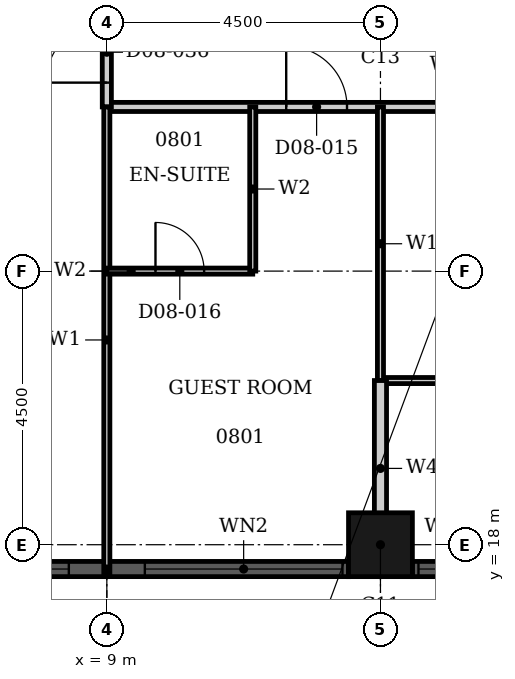
"""IFC4 building model, lengths in metres.
Left out: names, types, materials, properties, quantities, classifications, styles, units other than length and angle.
Written with IfcOpenShell. Run it as: python <this file> out.ifc"""

import sys

from ifc_helpers import new_model, si_unit, direction, frame, frame_2d, origin, origin_2d, place, context, subcontext, project, spatial, rectangle, hollow_rectangle, extrude, element, fill, save


model = new_model("IFC4")
c1 = context("Model", 3, precision=1e-05, world=origin(), true_north=direction((0.0, 1.0)))
c2 = subcontext(c1, "Body", "Model", "MODEL_VIEW")
j1 = project(units=[si_unit("LENGTHUNIT", "METRE"), si_unit("PLANEANGLEUNIT", "RADIAN")], contexts=[c1])
p1 = place(None, origin())
s1 = spatial("IfcSite", under=j1, at=p1, CompositionType="ELEMENT")
p2 = place(p1, origin())
s2 = spatial("IfcBuilding", under=s1, at=p2, CompositionType="ELEMENT")
p3 = place(p2, frame((0.0, 0.0, 40.8)))
s3 = spatial("IfcBuildingStorey", under=s2, at=p3, CompositionType="ELEMENT", Elevation=40.8)
p4 = place(p3, frame((13.5, 18.0, 0.0), z_axis=(0.0, 0.0, 1.0), x_axis=(1.0, 0.0, 0.0)))
e1 = element("IfcColumn", 1, at=p4, inside=s3, PredefinedType="COLUMN", context=c2, shape_type="SweptSolid", body=[
    extrude(hollow_rectangle(XDim=1.05, YDim=1.05, WallThickness=0.034, at=origin_2d()), origin(), (0.0, 0.0, 1.0), 3.6),
])
p5 = place(p3, frame((5.025, 17.6, 0.0), z_axis=(0.0, 0.0, 1.0), x_axis=(1.0, 0.0, 0.0)))
e2 = element("IfcWall", 2, at=p5, inside=s3, PredefinedType="SOLIDWALL", context=c2, shape_type="SweptSolid", body=[
    extrude(rectangle(XDim=7.95, YDim=0.25, at=frame_2d((3.975, 0.0))), origin(), (0.0, 0.0, 1.0), 3.6),
])
p6 = place(p5, frame((0.1, 0.0, 0.9)))
e3 = element("IfcOpeningElement", 3, at=p6, cuts=e2, PredefinedType="OPENING", context=c2, shape_type="SweptSolid", body=[
    extrude(rectangle(XDim=3.25, YDim=2.08, at=frame_2d((1.625, 1.04))), frame((0.0, 0.135, 0.0), z_axis=(0.0, -1.0, 0.0), x_axis=(1.0, 0.0, 0.0)), (0.0, 0.0, 1.0), 0.27),
])
p7 = place(p5, frame((4.6, 0.0, 0.9)))
e4 = element("IfcOpeningElement", 4, at=p7, cuts=e2, PredefinedType="OPENING", context=c2, shape_type="SweptSolid", body=[
    extrude(rectangle(XDim=3.25, YDim=2.08, at=frame_2d((1.625, 1.04))), frame((0.0, 0.135, 0.0), z_axis=(0.0, -1.0, 0.0), x_axis=(1.0, 0.0, 0.0)), (0.0, 0.0, 1.0), 0.27),
])
p8 = place(p3, frame((14.025, 17.6, 0.0), z_axis=(0.0, 0.0, 1.0), x_axis=(1.0, 0.0, 0.0)))
e5 = element("IfcWall", 5, at=p8, inside=s3, PredefinedType="SOLIDWALL", context=c2, shape_type="SweptSolid", body=[
    extrude(rectangle(XDim=1.2, YDim=0.25, at=frame_2d((0.6, 0.0))), origin(), (0.0, 0.0, 1.0), 3.6),
])
p9 = place(p8, frame((0.1, 0.0, 0.9)))
e6 = element("IfcOpeningElement", 6, at=p9, cuts=e5, PredefinedType="OPENING", context=c2, shape_type="SweptSolid", body=[
    extrude(rectangle(XDim=1.0, YDim=2.08, at=frame_2d((0.5, 1.04))), frame((0.0, 0.135, 0.0), z_axis=(0.0, -1.0, 0.0), x_axis=(1.0, 0.0, 0.0)), (0.0, 0.0, 1.0), 0.27),
])
p10 = place(p3, frame((9.0, 25.2, 0.0), z_axis=(0.0, 0.0, 1.0), x_axis=(1.0, 0.0, 0.0)))
e7 = element("IfcWall", 7, at=p10, inside=s3, PredefinedType="PARTITIONING", context=c2, shape_type="SweptSolid", body=[
    extrude(rectangle(XDim=7.2, YDim=0.15, at=frame_2d((3.6, 0.0))), origin(), (0.0, 0.0, 1.0), 3.3),
])
p11 = place(p10, frame((2.95, 0.0, 0.0)))
e8 = element("IfcOpeningElement", 8, at=p11, cuts=e7, PredefinedType="OPENING", context=c2, shape_type="SweptSolid", body=[
    extrude(rectangle(XDim=1.0, YDim=2.1, at=frame_2d((0.5, 1.05))), frame((0.0, 0.085, 0.0), z_axis=(0.0, -1.0, 0.0), x_axis=(1.0, 0.0, 0.0)), (0.0, 0.0, 1.0), 0.17),
])
p12 = place(p3, frame((9.0, 25.2, 0.0), z_axis=(0.0, 0.0, 1.0), x_axis=(0.0, 1.0, 0.0)))
e9 = element("IfcWall", 9, at=p12, inside=s3, PredefinedType="PARTITIONING", context=c2, shape_type="SweptSolid", body=[
    extrude(rectangle(XDim=1.8, YDim=0.15, at=frame_2d((0.9, 0.0))), origin(), (0.0, 0.0, 1.0), 3.3),
])
p13 = place(p12, frame((0.4, 0.0, 0.0)))
e10 = element("IfcOpeningElement", 10, at=p13, cuts=e9, PredefinedType="OPENING", context=c2, shape_type="SweptSolid", body=[
    extrude(rectangle(XDim=1.0, YDim=2.1, at=frame_2d((0.5, 1.05))), frame((0.0, 0.085, 0.0), z_axis=(0.0, -1.0, 0.0), x_axis=(1.0, 0.0, 0.0)), (0.0, 0.0, 1.0), 0.17),
])
p14 = place(p3, frame((13.5, 20.7, 0.0), z_axis=(0.0, 0.0, 1.0), x_axis=(1.0, 0.0, 0.0)))
e11 = element("IfcWall", 11, at=p14, inside=s3, PredefinedType="PARTITIONING", context=c2, shape_type="SweptSolid", body=[
    extrude(rectangle(XDim=2.7, YDim=0.1, at=frame_2d((1.35, 0.0))), origin(), (0.0, 0.0, 1.0), 3.3),
])
p15 = place(p3, frame((13.5, 20.7, 0.0), z_axis=(0.0, 0.0, 1.0), x_axis=(0.0, 1.0, 0.0)))
e12 = element("IfcWall", 12, at=p15, inside=s3, PredefinedType="PARTITIONING", context=c2, shape_type="SweptSolid", body=[
    extrude(rectangle(XDim=4.5, YDim=0.1, at=frame_2d((2.25, 0.0))), origin(), (0.0, 0.0, 1.0), 2.38),
])
p16 = place(p3, frame((9.0, 17.535, 0.0), z_axis=(0.0, 0.0, 1.0), x_axis=(0.0, 1.0, 0.0)))
e13 = element("IfcWall", 13, at=p16, inside=s3, PredefinedType="PARTITIONING", context=c2, shape_type="SweptSolid", body=[
    extrude(rectangle(XDim=7.665, YDim=0.1, at=frame_2d((3.833, 0.0))), origin(), (0.0, 0.0, 1.0), 3.3),
])
p17 = place(p3, frame((13.5, 17.81, 0.0), z_axis=(0.0, 0.0, 1.0), x_axis=(0.0, 1.0, 0.0)))
e14 = element("IfcWall", 14, at=p17, inside=s3, PredefinedType="PARTITIONING", context=c2, shape_type="SweptSolid", body=[
    extrude(rectangle(XDim=2.89, YDim=0.2, at=frame_2d((1.445, 0.0))), origin(), (0.0, 0.0, 1.0), 2.38),
])
p18 = place(p3, frame((9.0, 22.5, 0.0), z_axis=(0.0, 0.0, 1.0), x_axis=(1.0, 0.0, 0.0)))
e15 = element("IfcWall", 15, at=p18, inside=s3, PredefinedType="PARTITIONING", context=c2, shape_type="SweptSolid", body=[
    extrude(rectangle(XDim=2.4, YDim=0.1, at=frame_2d((1.2, 0.0))), origin(), (0.0, 0.0, 1.0), 2.58),
])
p19 = place(p18, frame((0.8, 0.0, 0.0)))
e16 = element("IfcOpeningElement", 16, at=p19, cuts=e15, PredefinedType="OPENING", context=c2, shape_type="SweptSolid", body=[
    extrude(rectangle(XDim=0.8, YDim=2.1, at=frame_2d((0.4, 1.05))), frame((0.0, 0.06, 0.0), z_axis=(0.0, -1.0, 0.0), x_axis=(1.0, 0.0, 0.0)), (0.0, 0.0, 1.0), 0.12),
])
p20 = place(p3, frame((11.4, 22.5, 0.0), z_axis=(0.0, 0.0, 1.0), x_axis=(0.0, 1.0, 0.0)))
e17 = element("IfcWall", 17, at=p20, inside=s3, PredefinedType="PARTITIONING", context=c2, shape_type="SweptSolid", body=[
    extrude(rectangle(XDim=2.7, YDim=0.1, at=frame_2d((1.35, 0.0))), origin(), (0.0, 0.0, 1.0), 3.3),
])
p21 = place(p6, origin())
e18 = element("IfcWindow", 18, at=p21, inside=s3, PartitioningType="SINGLE_PANEL", PredefinedType="WINDOW", context=c2, shape_type="SweptSolid", body=[
    extrude(rectangle(XDim=3.25, YDim=2.08, at=frame_2d((1.625, 1.04))), frame((0.0, 0.03, 0.0), z_axis=(0.0, -1.0, 0.0), x_axis=(1.0, 0.0, 0.0)), (0.0, 0.0, 1.0), 0.06),
])
fill(e3, e18)
p22 = place(p7, origin())
e19 = element("IfcWindow", 19, at=p22, inside=s3, PartitioningType="SINGLE_PANEL", PredefinedType="WINDOW", context=c2, shape_type="SweptSolid", body=[
    extrude(rectangle(XDim=3.25, YDim=2.08, at=frame_2d((1.625, 1.04))), frame((0.0, 0.03, 0.0), z_axis=(0.0, -1.0, 0.0), x_axis=(1.0, 0.0, 0.0)), (0.0, 0.0, 1.0), 0.06),
])
fill(e4, e19)
p23 = place(p9, origin())
e20 = element("IfcWindow", 20, at=p23, inside=s3, PartitioningType="SINGLE_PANEL", PredefinedType="WINDOW", context=c2, shape_type="SweptSolid", body=[
    extrude(rectangle(XDim=1.0, YDim=2.08, at=frame_2d((0.5, 1.04))), frame((0.0, 0.03, 0.0), z_axis=(0.0, -1.0, 0.0), x_axis=(1.0, 0.0, 0.0)), (0.0, 0.0, 1.0), 0.06),
])
fill(e6, e20)
p24 = place(p11, origin())
e21 = element("IfcDoor", 21, at=p24, inside=s3, OperationType="SINGLE_SWING_RIGHT", PredefinedType="DOOR", context=c2, shape_type="SweptSolid", body=[
    extrude(rectangle(XDim=1.0, YDim=2.1, at=frame_2d((0.5, 1.05))), frame((0.0, 0.025, 0.0), z_axis=(0.0, -1.0, 0.0), x_axis=(1.0, 0.0, 0.0)), (0.0, 0.0, 1.0), 0.05),
])
fill(e8, e21)
p25 = place(p19, origin())
e22 = element("IfcDoor", 22, at=p25, inside=s3, OperationType="SINGLE_SWING_RIGHT", PredefinedType="DOOR", context=c2, shape_type="SweptSolid", body=[
    extrude(rectangle(XDim=0.8, YDim=2.1, at=frame_2d((0.4, 1.05))), frame((0.0, 0.025, 0.0), z_axis=(0.0, -1.0, 0.0), x_axis=(1.0, 0.0, 0.0)), (0.0, 0.0, 1.0), 0.05),
])
fill(e16, e22)
p26 = place(p13, origin())
e23 = element("IfcDoor", 23, at=p26, inside=s3, OperationType="SINGLE_SWING_RIGHT", PredefinedType="DOOR", context=c2, shape_type="SweptSolid", body=[
    extrude(rectangle(XDim=1.0, YDim=2.1, at=frame_2d((0.5, 1.05))), frame((0.0, 0.025, 0.0), z_axis=(0.0, -1.0, 0.0), x_axis=(1.0, 0.0, 0.0)), (0.0, 0.0, 1.0), 0.05),
])
fill(e10, e23)
save(model, sys.argv[1])
